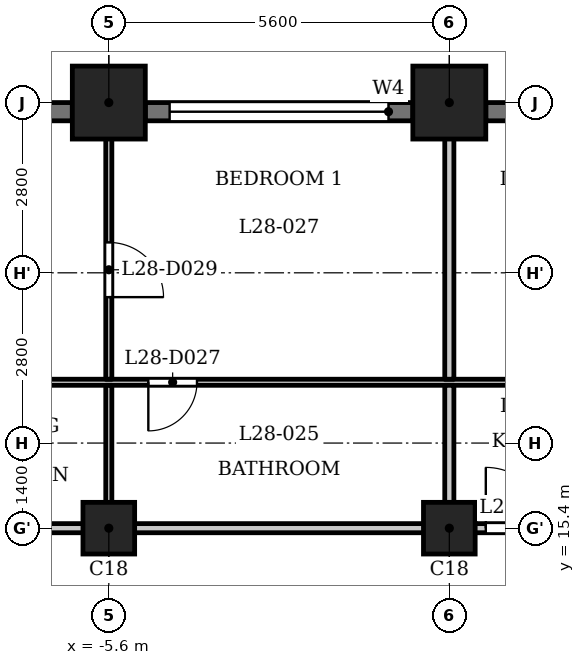
"""IFC4 building model, lengths in metres.
Left out: names, types, materials, properties, quantities, classifications, styles, units other than length and angle.
Written with IfcOpenShell. Run it as: python <this file> out.ifc"""

import sys

from ifc_helpers import new_model, si_unit, direction, frame, frame_2d, origin, origin_2d, place, context, subcontext, project, spatial, rectangle, extrude, element, fill, save


model = new_model("IFC4")
c1 = context("Model", 3, precision=1e-05, world=origin(), true_north=direction((0.0, 1.0)))
c2 = subcontext(c1, "Body", "Model", "MODEL_VIEW")
j1 = project(units=[si_unit("LENGTHUNIT", "METRE"), si_unit("PLANEANGLEUNIT", "RADIAN")], contexts=[c1])
p1 = place(None, origin())
s1 = spatial("IfcSite", under=j1, at=p1, CompositionType="ELEMENT")
p2 = place(p1, origin())
s2 = spatial("IfcBuilding", under=s1, at=p2, CompositionType="ELEMENT")
p3 = place(p2, frame((0.0, 0.0, 111.3)))
s3 = spatial("IfcBuildingStorey", under=s2, at=p3, CompositionType="ELEMENT", Elevation=111.3)
for number, where, z_axis, x_axis in (
    (1, (0.0, 22.4, 0.0), (0.0, 0.0, 1.0), (1.0, 0.0, 0.0)),
    (2, (-5.6, 22.4, 0.0), (0.0, 0.0, 1.0), (1.0, 0.0, 0.0)),
):
    element("IfcColumn", number, at=place(p3, frame(where, z_axis=z_axis, x_axis=x_axis)), inside=s3, PredefinedType="COLUMN", context=c2, shape_type="SweptSolid", body=[
        extrude(rectangle(XDim=1.2, YDim=1.2, at=origin_2d()), origin(), (0.0, 0.0, 1.0), 3.5),
    ])
for number, where, z_axis, x_axis in (
    (3, (-5.6, 15.4, 0.0), (0.0, 0.0, 1.0), (1.0, 0.0, 0.0)),
    (4, (0.0, 15.4, 0.0), (0.0, 0.0, 1.0), (1.0, 0.0, 0.0)),
):
    element("IfcColumn", number, at=place(p3, frame(where, z_axis=z_axis, x_axis=x_axis)), inside=s3, PredefinedType="COLUMN", context=c2, shape_type="SweptSolid", body=[
        extrude(rectangle(XDim=0.85, YDim=0.85, at=origin_2d()), origin(), (0.0, 0.0, 1.0), 3.5),
    ])
p4 = place(p3, frame((5.0, 22.25, 0.0), z_axis=(0.0, 0.0, 1.0), x_axis=(-1.0, 0.0, 0.0)))
e5 = element("IfcWall", 5, at=p4, inside=s3, PredefinedType="SOLIDWALL", context=c2, shape_type="SweptSolid", body=[
    extrude(rectangle(XDim=4.4, YDim=0.3, at=frame_2d((2.2, 0.0))), origin(), (0.0, 0.0, 1.0), 2.4),
])
p5 = place(p4, frame((0.4, 0.0, 1.2)))
e6 = element("IfcOpeningElement", 6, at=p5, cuts=e5, PredefinedType="OPENING", context=c2, shape_type="SweptSolid", body=[
    extrude(rectangle(XDim=3.6, YDim=0.95, at=frame_2d((1.8, 0.475))), frame((0.0, 0.16, 0.0), z_axis=(0.0, -1.0, 0.0), x_axis=(1.0, 0.0, 0.0)), (0.0, 0.0, 1.0), 0.32),
])
p6 = place(p3, frame((-0.6, 22.25, 0.0), z_axis=(0.0, 0.0, 1.0), x_axis=(-1.0, 0.0, 0.0)))
e7 = element("IfcWall", 7, at=p6, inside=s3, PredefinedType="SOLIDWALL", context=c2, shape_type="SweptSolid", body=[
    extrude(rectangle(XDim=4.4, YDim=0.3, at=frame_2d((2.2, 0.0))), origin(), (0.0, 0.0, 1.0), 2.4),
])
p7 = place(p6, frame((0.4, 0.0, 1.2)))
e8 = element("IfcOpeningElement", 8, at=p7, cuts=e7, PredefinedType="OPENING", context=c2, shape_type="SweptSolid", body=[
    extrude(rectangle(XDim=3.6, YDim=0.95, at=frame_2d((1.8, 0.475))), frame((0.0, 0.16, 0.0), z_axis=(0.0, -1.0, 0.0), x_axis=(1.0, 0.0, 0.0)), (0.0, 0.0, 1.0), 0.32),
])
p8 = place(p3, frame((-6.2, 22.25, 0.0), z_axis=(0.0, 0.0, 1.0), x_axis=(-1.0, 0.0, 0.0)))
e9 = element("IfcWall", 9, at=p8, inside=s3, PredefinedType="SOLIDWALL", context=c2, shape_type="SweptSolid", body=[
    extrude(rectangle(XDim=4.4, YDim=0.3, at=frame_2d((2.2, 0.0))), origin(), (0.0, 0.0, 1.0), 2.4),
])
p9 = place(p8, frame((0.4, 0.0, 1.2)))
e10 = element("IfcOpeningElement", 10, at=p9, cuts=e9, PredefinedType="OPENING", context=c2, shape_type="SweptSolid", body=[
    extrude(rectangle(XDim=3.6, YDim=0.95, at=frame_2d((1.8, 0.475))), frame((0.0, 0.16, 0.0), z_axis=(0.0, -1.0, 0.0), x_axis=(1.0, 0.0, 0.0)), (0.0, 0.0, 1.0), 0.32),
])
p10 = place(p3, frame((-27.484, 15.4, 0.0), z_axis=(0.0, 0.0, 1.0), x_axis=(1.0, 0.0, 0.0)))
e11 = element("IfcWall", 11, at=p10, inside=s3, PredefinedType="PARTITIONING", context=c2, shape_type="SweptSolid", body=[
    extrude(rectangle(XDim=54.968, YDim=0.15, at=frame_2d((27.484, 0.0))), origin(), (0.0, 0.0, 1.0), 3.2),
])
p11 = place(p10, frame((9.034, 0.0, 0.0)))
e12 = element("IfcOpeningElement", 12, at=p11, cuts=e11, PredefinedType="OPENING", context=c2, shape_type="SweptSolid", body=[
    extrude(rectangle(XDim=1.0, YDim=2.1, at=frame_2d((0.5, 1.05))), frame((0.0, 0.085, 0.0), z_axis=(0.0, -1.0, 0.0), x_axis=(1.0, 0.0, 0.0)), (0.0, 0.0, 1.0), 0.17),
])
p12 = place(p10, frame((14.634, 0.0, 0.0)))
e13 = element("IfcOpeningElement", 13, at=p12, cuts=e11, PredefinedType="OPENING", context=c2, shape_type="SweptSolid", body=[
    extrude(rectangle(XDim=1.0, YDim=2.1, at=frame_2d((0.5, 1.05))), frame((0.0, 0.085, 0.0), z_axis=(0.0, -1.0, 0.0), x_axis=(1.0, 0.0, 0.0)), (0.0, 0.0, 1.0), 0.17),
])
p13 = place(p10, frame((16.984, 0.0, 0.0)))
e14 = element("IfcOpeningElement", 14, at=p13, cuts=e11, PredefinedType="OPENING", context=c2, shape_type="SweptSolid", body=[
    extrude(rectangle(XDim=1.0, YDim=2.1, at=frame_2d((0.5, 1.05))), frame((0.0, 0.085, 0.0), z_axis=(0.0, -1.0, 0.0), x_axis=(1.0, 0.0, 0.0)), (0.0, 0.0, 1.0), 0.17),
])
p14 = place(p10, frame((28.084, 0.0, 0.0)))
e15 = element("IfcOpeningElement", 15, at=p14, cuts=e11, PredefinedType="OPENING", context=c2, shape_type="SweptSolid", body=[
    extrude(rectangle(XDim=1.0, YDim=2.1, at=frame_2d((0.5, 1.05))), frame((0.0, 0.085, 0.0), z_axis=(0.0, -1.0, 0.0), x_axis=(1.0, 0.0, 0.0)), (0.0, 0.0, 1.0), 0.17),
])
p15 = place(p10, frame((34.834, 0.0, 0.0)))
e16 = element("IfcOpeningElement", 16, at=p15, cuts=e11, PredefinedType="OPENING", context=c2, shape_type="SweptSolid", body=[
    extrude(rectangle(XDim=1.0, YDim=2.1, at=frame_2d((0.5, 1.05))), frame((0.0, 0.085, 0.0), z_axis=(0.0, -1.0, 0.0), x_axis=(1.0, 0.0, 0.0)), (0.0, 0.0, 1.0), 0.17),
])
p16 = place(p10, frame((41.884, 0.0, 0.0)))
e17 = element("IfcOpeningElement", 17, at=p16, cuts=e11, PredefinedType="OPENING", context=c2, shape_type="SweptSolid", body=[
    extrude(rectangle(XDim=1.0, YDim=2.1, at=frame_2d((0.5, 1.05))), frame((0.0, 0.085, 0.0), z_axis=(0.0, -1.0, 0.0), x_axis=(1.0, 0.0, 0.0)), (0.0, 0.0, 1.0), 0.17),
])
p17 = place(p10, frame((48.234, 0.0, 0.0)))
e18 = element("IfcOpeningElement", 18, at=p17, cuts=e11, PredefinedType="OPENING", context=c2, shape_type="SweptSolid", body=[
    extrude(rectangle(XDim=1.0, YDim=2.1, at=frame_2d((0.5, 1.05))), frame((0.0, 0.085, 0.0), z_axis=(0.0, -1.0, 0.0), x_axis=(1.0, 0.0, 0.0)), (0.0, 0.0, 1.0), 0.17),
])
p18 = place(p3, frame((-26.465, 17.8, 0.0), z_axis=(0.0, 0.0, 1.0), x_axis=(1.0, 0.0, 0.0)))
e19 = element("IfcWall", 19, at=p18, inside=s3, PredefinedType="PARTITIONING", context=c2, shape_type="SweptSolid", body=[
    extrude(rectangle(XDim=52.859, YDim=0.1, at=frame_2d((26.43, 0.0))), origin(), (0.0, 0.0, 1.0), 3.2),
])
p19 = place(p18, frame((2.697, 0.0, 0.0)))
e20 = element("IfcOpeningElement", 20, at=p19, cuts=e19, PredefinedType="OPENING", context=c2, shape_type="SweptSolid", body=[
    extrude(rectangle(XDim=0.8, YDim=2.1, at=frame_2d((0.4, 1.05))), frame((0.0, 0.06, 0.0), z_axis=(0.0, -1.0, 0.0), x_axis=(1.0, 0.0, 0.0)), (0.0, 0.0, 1.0), 0.12),
])
p20 = place(p18, frame((7.115, 0.0, 0.0)))
e21 = element("IfcOpeningElement", 21, at=p20, cuts=e19, PredefinedType="OPENING", context=c2, shape_type="SweptSolid", body=[
    extrude(rectangle(XDim=0.9, YDim=2.1, at=frame_2d((0.45, 1.05))), frame((0.0, 0.06, 0.0), z_axis=(0.0, -1.0, 0.0), x_axis=(1.0, 0.0, 0.0)), (0.0, 0.0, 1.0), 0.12),
])
p21 = place(p18, frame((10.315, 0.0, 0.0)))
e22 = element("IfcOpeningElement", 22, at=p21, cuts=e19, PredefinedType="OPENING", context=c2, shape_type="SweptSolid", body=[
    extrude(rectangle(XDim=0.8, YDim=2.1, at=frame_2d((0.4, 1.05))), frame((0.0, 0.06, 0.0), z_axis=(0.0, -1.0, 0.0), x_axis=(1.0, 0.0, 0.0)), (0.0, 0.0, 1.0), 0.12),
])
p22 = place(p18, frame((12.715, 0.0, 0.0)))
e23 = element("IfcOpeningElement", 23, at=p22, cuts=e19, PredefinedType="OPENING", context=c2, shape_type="SweptSolid", body=[
    extrude(rectangle(XDim=0.9, YDim=2.1, at=frame_2d((0.45, 1.05))), frame((0.0, 0.06, 0.0), z_axis=(0.0, -1.0, 0.0), x_axis=(1.0, 0.0, 0.0)), (0.0, 0.0, 1.0), 0.12),
])
p23 = place(p18, frame((21.515, 0.0, 0.0)))
e24 = element("IfcOpeningElement", 24, at=p23, cuts=e19, PredefinedType="OPENING", context=c2, shape_type="SweptSolid", body=[
    extrude(rectangle(XDim=0.8, YDim=2.1, at=frame_2d((0.4, 1.05))), frame((0.0, 0.06, 0.0), z_axis=(0.0, -1.0, 0.0), x_axis=(1.0, 0.0, 0.0)), (0.0, 0.0, 1.0), 0.12),
])
p24 = place(p18, frame((17.065, 0.0, 0.0)))
e25 = element("IfcOpeningElement", 25, at=p24, cuts=e19, PredefinedType="OPENING", context=c2, shape_type="SweptSolid", body=[
    extrude(rectangle(XDim=0.9, YDim=2.1, at=frame_2d((0.45, 1.05))), frame((0.0, 0.06, 0.0), z_axis=(0.0, -1.0, 0.0), x_axis=(1.0, 0.0, 0.0)), (0.0, 0.0, 1.0), 0.12),
])
p25 = place(p18, frame((30.365, 0.0, 0.0)))
e26 = element("IfcOpeningElement", 26, at=p25, cuts=e19, PredefinedType="OPENING", context=c2, shape_type="SweptSolid", body=[
    extrude(rectangle(XDim=0.8, YDim=2.1, at=frame_2d((0.4, 1.05))), frame((0.0, 0.06, 0.0), z_axis=(0.0, -1.0, 0.0), x_axis=(1.0, 0.0, 0.0)), (0.0, 0.0, 1.0), 0.12),
])
p26 = place(p18, frame((28.165, 0.0, 0.0)))
e27 = element("IfcOpeningElement", 27, at=p26, cuts=e19, PredefinedType="OPENING", context=c2, shape_type="SweptSolid", body=[
    extrude(rectangle(XDim=0.9, YDim=2.1, at=frame_2d((0.45, 1.05))), frame((0.0, 0.06, 0.0), z_axis=(0.0, -1.0, 0.0), x_axis=(1.0, 0.0, 0.0)), (0.0, 0.0, 1.0), 0.12),
])
p27 = place(p18, frame((36.115, 0.0, 0.0)))
e28 = element("IfcOpeningElement", 28, at=p27, cuts=e19, PredefinedType="OPENING", context=c2, shape_type="SweptSolid", body=[
    extrude(rectangle(XDim=0.8, YDim=2.1, at=frame_2d((0.4, 1.05))), frame((0.0, 0.06, 0.0), z_axis=(0.0, -1.0, 0.0), x_axis=(1.0, 0.0, 0.0)), (0.0, 0.0, 1.0), 0.12),
])
p28 = place(p18, frame((32.915, 0.0, 0.0)))
e29 = element("IfcOpeningElement", 29, at=p28, cuts=e19, PredefinedType="OPENING", context=c2, shape_type="SweptSolid", body=[
    extrude(rectangle(XDim=0.9, YDim=2.1, at=frame_2d((0.45, 1.05))), frame((0.0, 0.06, 0.0), z_axis=(0.0, -1.0, 0.0), x_axis=(1.0, 0.0, 0.0)), (0.0, 0.0, 1.0), 0.12),
])
p29 = place(p18, frame((38.315, 0.0, 0.0)))
e30 = element("IfcOpeningElement", 30, at=p29, cuts=e19, PredefinedType="OPENING", context=c2, shape_type="SweptSolid", body=[
    extrude(rectangle(XDim=0.8, YDim=2.1, at=frame_2d((0.4, 1.05))), frame((0.0, 0.06, 0.0), z_axis=(0.0, -1.0, 0.0), x_axis=(1.0, 0.0, 0.0)), (0.0, 0.0, 1.0), 0.12),
])
p30 = place(p18, frame((40.965, 0.0, 0.0)))
e31 = element("IfcOpeningElement", 31, at=p30, cuts=e19, PredefinedType="OPENING", context=c2, shape_type="SweptSolid", body=[
    extrude(rectangle(XDim=0.9, YDim=2.1, at=frame_2d((0.45, 1.05))), frame((0.0, 0.06, 0.0), z_axis=(0.0, -1.0, 0.0), x_axis=(1.0, 0.0, 0.0)), (0.0, 0.0, 1.0), 0.12),
])
p31 = place(p18, frame((51.265, 0.0, 0.0)))
e32 = element("IfcOpeningElement", 32, at=p31, cuts=e19, PredefinedType="OPENING", context=c2, shape_type="SweptSolid", body=[
    extrude(rectangle(XDim=0.8, YDim=2.1, at=frame_2d((0.4, 1.05))), frame((0.0, 0.06, 0.0), z_axis=(0.0, -1.0, 0.0), x_axis=(1.0, 0.0, 0.0)), (0.0, 0.0, 1.0), 0.12),
])
p32 = place(p18, frame((46.315, 0.0, 0.0)))
e33 = element("IfcOpeningElement", 33, at=p32, cuts=e19, PredefinedType="OPENING", context=c2, shape_type="SweptSolid", body=[
    extrude(rectangle(XDim=0.9, YDim=2.1, at=frame_2d((0.45, 1.05))), frame((0.0, 0.06, 0.0), z_axis=(0.0, -1.0, 0.0), x_axis=(1.0, 0.0, 0.0)), (0.0, 0.0, 1.0), 0.12),
])
p33 = place(p3, frame((-5.6, 15.475, 0.0), z_axis=(0.0, 0.0, 1.0), x_axis=(0.0, 1.0, 0.0)))
e34 = element("IfcWall", 34, at=p33, inside=s3, PredefinedType="PARTITIONING", context=c2, shape_type="SweptSolid", body=[
    extrude(rectangle(XDim=2.275, YDim=0.1, at=frame_2d((1.137, 0.0))), origin(), (0.0, 0.0, 1.0), 3.2),
])
p34 = place(p3, frame((-5.6, 17.85, 0.0), z_axis=(0.0, 0.0, 1.0), x_axis=(0.0, 1.0, 0.0)))
e35 = element("IfcWall", 35, at=p34, inside=s3, PredefinedType="PARTITIONING", context=c2, shape_type="SweptSolid", body=[
    extrude(rectangle(XDim=5.13, YDim=0.1, at=frame_2d((2.565, 0.0))), origin(), (0.0, 0.0, 1.0), 3.2),
])
p35 = place(p34, frame((1.35, 0.0, 0.0)))
e36 = element("IfcOpeningElement", 36, at=p35, cuts=e35, PredefinedType="OPENING", context=c2, shape_type="SweptSolid", body=[
    extrude(rectangle(XDim=0.9, YDim=2.1, at=frame_2d((0.45, 1.05))), frame((0.0, 0.06, 0.0), z_axis=(0.0, -1.0, 0.0), x_axis=(1.0, 0.0, 0.0)), (0.0, 0.0, 1.0), 0.12),
])
p36 = place(p3, frame((0.0, 15.475, 0.0), z_axis=(0.0, 0.0, 1.0), x_axis=(0.0, 1.0, 0.0)))
e37 = element("IfcWall", 37, at=p36, inside=s3, PredefinedType="PARTITIONING", context=c2, shape_type="SweptSolid", body=[
    extrude(rectangle(XDim=2.275, YDim=0.15, at=frame_2d((1.137, 0.0))), origin(), (0.0, 0.0, 1.0), 3.2),
])
p37 = place(p3, frame((0.0, 17.85, 0.0), z_axis=(0.0, 0.0, 1.0), x_axis=(0.0, 1.0, 0.0)))
e38 = element("IfcWall", 38, at=p37, inside=s3, PredefinedType="PARTITIONING", context=c2, shape_type="SweptSolid", body=[
    extrude(rectangle(XDim=5.13, YDim=0.15, at=frame_2d((2.565, 0.0))), origin(), (0.0, 0.0, 1.0), 3.2),
])
p38 = place(p23, origin())
e39 = element("IfcDoor", 39, at=p38, inside=s3, OperationType="SINGLE_SWING_LEFT", PredefinedType="DOOR", context=c2, shape_type="SweptSolid", body=[
    extrude(rectangle(XDim=0.8, YDim=2.1, at=frame_2d((0.4, 1.05))), frame((0.0, 0.025, 0.0), z_axis=(0.0, -1.0, 0.0), x_axis=(1.0, 0.0, 0.0)), (0.0, 0.0, 1.0), 0.05),
])
fill(e24, e39)
p39 = place(p35, origin())
e40 = element("IfcDoor", 40, at=p39, inside=s3, OperationType="SINGLE_SWING_LEFT", PredefinedType="DOOR", context=c2, shape_type="SweptSolid", body=[
    extrude(rectangle(XDim=0.9, YDim=2.1, at=frame_2d((0.45, 1.05))), frame((0.0, 0.025, 0.0), z_axis=(0.0, -1.0, 0.0), x_axis=(1.0, 0.0, 0.0)), (0.0, 0.0, 1.0), 0.05),
])
fill(e36, e40)
p40 = place(p14, origin())
e41 = element("IfcDoor", 41, at=p40, inside=s3, OperationType="SINGLE_SWING_RIGHT", PredefinedType="DOOR", context=c2, shape_type="SweptSolid", body=[
    extrude(rectangle(XDim=1.0, YDim=2.1, at=frame_2d((0.5, 1.05))), frame((0.0, 0.025, 0.0), z_axis=(0.0, -1.0, 0.0), x_axis=(1.0, 0.0, 0.0)), (0.0, 0.0, 1.0), 0.05),
])
fill(e15, e41)
p41 = place(p7, origin())
e42 = element("IfcWindow", 42, at=p41, inside=s3, PartitioningType="SINGLE_PANEL", PredefinedType="WINDOW", context=c2, shape_type="SweptSolid", body=[
    extrude(rectangle(XDim=3.6, YDim=0.95, at=frame_2d((1.8, 0.475))), frame((0.0, 0.03, 0.0), z_axis=(0.0, -1.0, 0.0), x_axis=(1.0, 0.0, 0.0)), (0.0, 0.0, 1.0), 0.06),
])
fill(e8, e42)
save(model, sys.argv[1])
